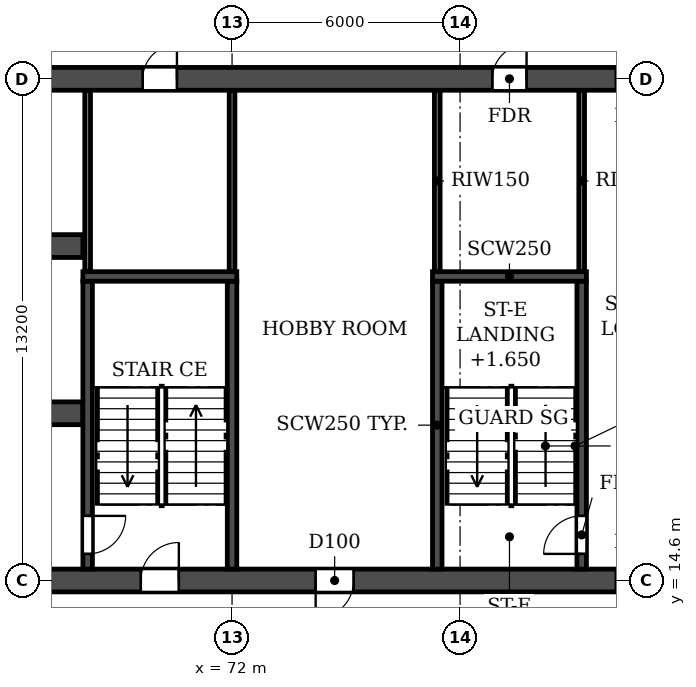
"""IFC4 building model, lengths in metres.
Left out: names, types, materials, properties, quantities, classifications, styles, units other than length and angle.
Written with IfcOpenShell. Run it as: python <this file> out.ifc"""

import sys

from ifc_helpers import new_model, si_unit, direction, frame, frame_2d, origin, place, context, subcontext, project, spatial, rectangle, extrude, element, fill, save


model = new_model("IFC4")
c1 = context("Model", 3, precision=1e-05, world=origin(), true_north=direction((0.0, 1.0)))
c2 = subcontext(c1, "Body", "Model", "MODEL_VIEW")
j1 = project(units=[si_unit("LENGTHUNIT", "METRE"), si_unit("PLANEANGLEUNIT", "RADIAN")], contexts=[c1])
p1 = place(None, origin())
s1 = spatial("IfcSite", under=j1, at=p1, CompositionType="ELEMENT")
p2 = place(p1, origin())
s2 = spatial("IfcBuilding", under=s1, at=p2, CompositionType="ELEMENT")
p3 = place(p2, frame((0.0, 0.0, 33.3)))
s3 = spatial("IfcBuildingStorey", under=s2, at=p3, CompositionType="ELEMENT", Elevation=33.3)
p4 = place(p3, frame((2.6, 14.6, 0.0), z_axis=(0.0, 0.0, 1.0), x_axis=(1.0, 0.0, 0.0)))
e1 = element("IfcWall", 1, at=p4, inside=s3, PredefinedType="SOLIDWALL", context=c2, shape_type="SweptSolid", body=[
    extrude(rectangle(XDim=96.8, YDim=0.6, at=frame_2d((48.4, 0.0))), origin(), (0.0, 0.0, 1.0), 3.05),
])
p5 = place(p4, frame((1.8, 0.0, 0.0)))
e2 = element("IfcOpeningElement", 2, at=p5, cuts=e1, PredefinedType="OPENING", context=c2, shape_type="SweptSolid", body=[
    extrude(rectangle(XDim=1.0, YDim=2.1, at=frame_2d((0.5, 1.05))), frame((0.0, 0.31, 0.0), z_axis=(0.0, -1.0, 0.0), x_axis=(1.0, 0.0, 0.0)), (0.0, 0.0, 1.0), 0.62),
])
p6 = place(p4, frame((9.5, 0.0, 0.0)))
e3 = element("IfcOpeningElement", 3, at=p6, cuts=e1, PredefinedType="OPENING", context=c2, shape_type="SweptSolid", body=[
    extrude(rectangle(XDim=1.0, YDim=2.1, at=frame_2d((0.5, 1.05))), frame((0.0, 0.31, 0.0), z_axis=(0.0, -1.0, 0.0), x_axis=(1.0, 0.0, 0.0)), (0.0, 0.0, 1.0), 0.62),
])
p7 = place(p4, frame((16.3, 0.0, 0.0)))
e4 = element("IfcOpeningElement", 4, at=p7, cuts=e1, PredefinedType="OPENING", context=c2, shape_type="SweptSolid", body=[
    extrude(rectangle(XDim=1.0, YDim=2.1, at=frame_2d((0.5, 1.05))), frame((0.0, 0.31, 0.0), z_axis=(0.0, -1.0, 0.0), x_axis=(1.0, 0.0, 0.0)), (0.0, 0.0, 1.0), 0.62),
])
p8 = place(p4, frame((24.2, 0.0, 0.0)))
e5 = element("IfcOpeningElement", 5, at=p8, cuts=e1, PredefinedType="OPENING", context=c2, shape_type="SweptSolid", body=[
    extrude(rectangle(XDim=1.0, YDim=2.1, at=frame_2d((0.5, 1.05))), frame((0.0, 0.31, 0.0), z_axis=(0.0, -1.0, 0.0), x_axis=(1.0, 0.0, 0.0)), (0.0, 0.0, 1.0), 0.62),
])
p9 = place(p4, frame((28.8, 0.0, 0.0)))
e6 = element("IfcOpeningElement", 6, at=p9, cuts=e1, PredefinedType="OPENING", context=c2, shape_type="SweptSolid", body=[
    extrude(rectangle(XDim=1.0, YDim=2.1, at=frame_2d((0.5, 1.05))), frame((0.0, 0.31, 0.0), z_axis=(0.0, -1.0, 0.0), x_axis=(1.0, 0.0, 0.0)), (0.0, 0.0, 1.0), 0.62),
])
p10 = place(p4, frame((42.7, 0.0, 0.0)))
e7 = element("IfcOpeningElement", 7, at=p10, cuts=e1, PredefinedType="OPENING", context=c2, shape_type="SweptSolid", body=[
    extrude(rectangle(XDim=1.0, YDim=2.1, at=frame_2d((0.5, 1.05))), frame((0.0, 0.31, 0.0), z_axis=(0.0, -1.0, 0.0), x_axis=(1.0, 0.0, 0.0)), (0.0, 0.0, 1.0), 0.62),
])
p11 = place(p4, frame((47.9, 0.0, 0.0)))
e8 = element("IfcOpeningElement", 8, at=p11, cuts=e1, PredefinedType="OPENING", context=c2, shape_type="SweptSolid", body=[
    extrude(rectangle(XDim=1.0, YDim=2.1, at=frame_2d((0.5, 1.05))), frame((0.0, 0.31, 0.0), z_axis=(0.0, -1.0, 0.0), x_axis=(1.0, 0.0, 0.0)), (0.0, 0.0, 1.0), 0.62),
])
p12 = place(p4, frame((53.1, 0.0, 0.0)))
e9 = element("IfcOpeningElement", 9, at=p12, cuts=e1, PredefinedType="OPENING", context=c2, shape_type="SweptSolid", body=[
    extrude(rectangle(XDim=1.0, YDim=2.1, at=frame_2d((0.5, 1.05))), frame((0.0, 0.31, 0.0), z_axis=(0.0, -1.0, 0.0), x_axis=(1.0, 0.0, 0.0)), (0.0, 0.0, 1.0), 0.62),
])
p13 = place(p4, frame((67.0, 0.0, 0.0)))
e10 = element("IfcOpeningElement", 10, at=p13, cuts=e1, PredefinedType="OPENING", context=c2, shape_type="SweptSolid", body=[
    extrude(rectangle(XDim=1.0, YDim=2.1, at=frame_2d((0.5, 1.05))), frame((0.0, 0.31, 0.0), z_axis=(0.0, -1.0, 0.0), x_axis=(1.0, 0.0, 0.0)), (0.0, 0.0, 1.0), 0.62),
])
p14 = place(p4, frame((71.6, 0.0, 0.0)))
e11 = element("IfcOpeningElement", 11, at=p14, cuts=e1, PredefinedType="OPENING", context=c2, shape_type="SweptSolid", body=[
    extrude(rectangle(XDim=1.0, YDim=2.1, at=frame_2d((0.5, 1.05))), frame((0.0, 0.31, 0.0), z_axis=(0.0, -1.0, 0.0), x_axis=(1.0, 0.0, 0.0)), (0.0, 0.0, 1.0), 0.62),
])
p15 = place(p4, frame((79.5, 0.0, 0.0)))
e12 = element("IfcOpeningElement", 12, at=p15, cuts=e1, PredefinedType="OPENING", context=c2, shape_type="SweptSolid", body=[
    extrude(rectangle(XDim=1.0, YDim=2.1, at=frame_2d((0.5, 1.05))), frame((0.0, 0.31, 0.0), z_axis=(0.0, -1.0, 0.0), x_axis=(1.0, 0.0, 0.0)), (0.0, 0.0, 1.0), 0.62),
])
p16 = place(p4, frame((88.6, 0.0, 0.0)))
e13 = element("IfcOpeningElement", 13, at=p16, cuts=e1, PredefinedType="OPENING", context=c2, shape_type="SweptSolid", body=[
    extrude(rectangle(XDim=1.0, YDim=2.1, at=frame_2d((0.5, 1.05))), frame((0.0, 0.31, 0.0), z_axis=(0.0, -1.0, 0.0), x_axis=(1.0, 0.0, 0.0)), (0.0, 0.0, 1.0), 0.62),
])
p17 = place(p3, frame((2.6, 27.8, 0.0), z_axis=(0.0, 0.0, 1.0), x_axis=(1.0, 0.0, 0.0)))
e14 = element("IfcWall", 14, at=p17, inside=s3, PredefinedType="SOLIDWALL", context=c2, shape_type="SweptSolid", body=[
    extrude(rectangle(XDim=96.8, YDim=0.6, at=frame_2d((48.4, 0.0))), origin(), (0.0, 0.0, 1.0), 3.05),
])
p18 = place(p17, frame((2.55, 0.0, 0.0)))
e15 = element("IfcOpeningElement", 15, at=p18, cuts=e14, PredefinedType="OPENING", context=c2, shape_type="SweptSolid", body=[
    extrude(rectangle(XDim=1.0, YDim=2.1, at=frame_2d((0.5, 1.05))), frame((0.0, 0.31, 0.0), z_axis=(0.0, -1.0, 0.0), x_axis=(1.0, 0.0, 0.0)), (0.0, 0.0, 1.0), 0.62),
])
p19 = place(p17, frame((10.25, 0.0, 0.0)))
e16 = element("IfcOpeningElement", 16, at=p19, cuts=e14, PredefinedType="OPENING", context=c2, shape_type="SweptSolid", body=[
    extrude(rectangle(XDim=1.0, YDim=2.1, at=frame_2d((0.5, 1.05))), frame((0.0, 0.31, 0.0), z_axis=(0.0, -1.0, 0.0), x_axis=(1.0, 0.0, 0.0)), (0.0, 0.0, 1.0), 0.62),
])
p20 = place(p17, frame((16.3, 0.0, 0.0)))
e17 = element("IfcOpeningElement", 17, at=p20, cuts=e14, PredefinedType="OPENING", context=c2, shape_type="SweptSolid", body=[
    extrude(rectangle(XDim=1.0, YDim=2.1, at=frame_2d((0.5, 1.05))), frame((0.0, 0.31, 0.0), z_axis=(0.0, -1.0, 0.0), x_axis=(1.0, 0.0, 0.0)), (0.0, 0.0, 1.0), 0.62),
])
p21 = place(p17, frame((19.65, 0.0, 0.0)))
e18 = element("IfcOpeningElement", 18, at=p21, cuts=e14, PredefinedType="OPENING", context=c2, shape_type="SweptSolid", body=[
    extrude(rectangle(XDim=0.9, YDim=2.1, at=frame_2d((0.45, 1.05))), frame((0.0, 0.31, 0.0), z_axis=(0.0, -1.0, 0.0), x_axis=(1.0, 0.0, 0.0)), (0.0, 0.0, 1.0), 0.62),
])
p22 = place(p17, frame((28.85, 0.0, 0.0)))
e19 = element("IfcOpeningElement", 19, at=p22, cuts=e14, PredefinedType="OPENING", context=c2, shape_type="SweptSolid", body=[
    extrude(rectangle(XDim=0.9, YDim=2.1, at=frame_2d((0.45, 1.05))), frame((0.0, 0.31, 0.0), z_axis=(0.0, -1.0, 0.0), x_axis=(1.0, 0.0, 0.0)), (0.0, 0.0, 1.0), 0.62),
])
p23 = place(p17, frame((34.6, 0.0, 0.0)))
e20 = element("IfcOpeningElement", 20, at=p23, cuts=e14, PredefinedType="OPENING", context=c2, shape_type="SweptSolid", body=[
    extrude(rectangle(XDim=1.0, YDim=2.1, at=frame_2d((0.5, 1.05))), frame((0.0, 0.31, 0.0), z_axis=(0.0, -1.0, 0.0), x_axis=(1.0, 0.0, 0.0)), (0.0, 0.0, 1.0), 0.62),
])
p24 = place(p17, frame((39.8, 0.0, 0.0)))
e21 = element("IfcOpeningElement", 21, at=p24, cuts=e14, PredefinedType="OPENING", context=c2, shape_type="SweptSolid", body=[
    extrude(rectangle(XDim=1.0, YDim=2.1, at=frame_2d((0.5, 1.05))), frame((0.0, 0.31, 0.0), z_axis=(0.0, -1.0, 0.0), x_axis=(1.0, 0.0, 0.0)), (0.0, 0.0, 1.0), 0.62),
])
p25 = place(p17, frame((45.0, 0.0, 0.0)))
e22 = element("IfcOpeningElement", 22, at=p25, cuts=e14, PredefinedType="OPENING", context=c2, shape_type="SweptSolid", body=[
    extrude(rectangle(XDim=1.0, YDim=2.1, at=frame_2d((0.5, 1.05))), frame((0.0, 0.31, 0.0), z_axis=(0.0, -1.0, 0.0), x_axis=(1.0, 0.0, 0.0)), (0.0, 0.0, 1.0), 0.62),
])
p26 = place(p17, frame((47.9, 0.0, 0.0)))
e23 = element("IfcOpeningElement", 23, at=p26, cuts=e14, PredefinedType="OPENING", context=c2, shape_type="SweptSolid", body=[
    extrude(rectangle(XDim=1.0, YDim=2.1, at=frame_2d((0.5, 1.05))), frame((0.0, 0.31, 0.0), z_axis=(0.0, -1.0, 0.0), x_axis=(1.0, 0.0, 0.0)), (0.0, 0.0, 1.0), 0.62),
])
p27 = place(p17, frame((50.8, 0.0, 0.0)))
e24 = element("IfcOpeningElement", 24, at=p27, cuts=e14, PredefinedType="OPENING", context=c2, shape_type="SweptSolid", body=[
    extrude(rectangle(XDim=1.0, YDim=2.1, at=frame_2d((0.5, 1.05))), frame((0.0, 0.31, 0.0), z_axis=(0.0, -1.0, 0.0), x_axis=(1.0, 0.0, 0.0)), (0.0, 0.0, 1.0), 0.62),
])
p28 = place(p17, frame((54.7, 0.0, 0.0)))
e25 = element("IfcOpeningElement", 25, at=p28, cuts=e14, PredefinedType="OPENING", context=c2, shape_type="SweptSolid", body=[
    extrude(rectangle(XDim=1.0, YDim=2.1, at=frame_2d((0.5, 1.05))), frame((0.0, 0.31, 0.0), z_axis=(0.0, -1.0, 0.0), x_axis=(1.0, 0.0, 0.0)), (0.0, 0.0, 1.0), 0.62),
])
p29 = place(p17, frame((61.2, 0.0, 0.0)))
e26 = element("IfcOpeningElement", 26, at=p29, cuts=e14, PredefinedType="OPENING", context=c2, shape_type="SweptSolid", body=[
    extrude(rectangle(XDim=1.0, YDim=2.1, at=frame_2d((0.5, 1.05))), frame((0.0, 0.31, 0.0), z_axis=(0.0, -1.0, 0.0), x_axis=(1.0, 0.0, 0.0)), (0.0, 0.0, 1.0), 0.62),
])
p30 = place(p17, frame((67.05, 0.0, 0.0)))
e27 = element("IfcOpeningElement", 27, at=p30, cuts=e14, PredefinedType="OPENING", context=c2, shape_type="SweptSolid", body=[
    extrude(rectangle(XDim=0.9, YDim=2.1, at=frame_2d((0.45, 1.05))), frame((0.0, 0.31, 0.0), z_axis=(0.0, -1.0, 0.0), x_axis=(1.0, 0.0, 0.0)), (0.0, 0.0, 1.0), 0.62),
])
p31 = place(p17, frame((76.25, 0.0, 0.0)))
e28 = element("IfcOpeningElement", 28, at=p31, cuts=e14, PredefinedType="OPENING", context=c2, shape_type="SweptSolid", body=[
    extrude(rectangle(XDim=0.9, YDim=2.1, at=frame_2d((0.45, 1.05))), frame((0.0, 0.31, 0.0), z_axis=(0.0, -1.0, 0.0), x_axis=(1.0, 0.0, 0.0)), (0.0, 0.0, 1.0), 0.62),
])
p32 = place(p17, frame((79.5, 0.0, 0.0)))
e29 = element("IfcOpeningElement", 29, at=p32, cuts=e14, PredefinedType="OPENING", context=c2, shape_type="SweptSolid", body=[
    extrude(rectangle(XDim=1.0, YDim=2.1, at=frame_2d((0.5, 1.05))), frame((0.0, 0.31, 0.0), z_axis=(0.0, -1.0, 0.0), x_axis=(1.0, 0.0, 0.0)), (0.0, 0.0, 1.0), 0.62),
])
p33 = place(p17, frame((86.05, 0.0, 0.0)))
e30 = element("IfcOpeningElement", 30, at=p33, cuts=e14, PredefinedType="OPENING", context=c2, shape_type="SweptSolid", body=[
    extrude(rectangle(XDim=1.5, YDim=2.1, at=frame_2d((0.75, 1.05))), frame((0.0, 0.31, 0.0), z_axis=(0.0, -1.0, 0.0), x_axis=(1.0, 0.0, 0.0)), (0.0, 0.0, 1.0), 0.62),
])
p34 = place(p17, frame((94.0, 0.0, 0.0)))
e31 = element("IfcOpeningElement", 31, at=p34, cuts=e14, PredefinedType="OPENING", context=c2, shape_type="SweptSolid", body=[
    extrude(rectangle(XDim=1.0, YDim=2.1, at=frame_2d((0.5, 1.05))), frame((0.0, 0.31, 0.0), z_axis=(0.0, -1.0, 0.0), x_axis=(1.0, 0.0, 0.0)), (0.0, 0.0, 1.0), 0.62),
])
p35 = place(p3, frame((33.925, 19.0, 0.0), z_axis=(0.0, 0.0, 1.0), x_axis=(1.0, 0.0, 0.0)))
e32 = element("IfcWall", 32, at=p35, inside=s3, PredefinedType="SOLIDWALL", context=c2, shape_type="SweptSolid", body=[
    extrude(rectangle(XDim=34.15, YDim=0.6, at=frame_2d((17.075, 0.0))), origin(), (0.0, 0.0, 1.0), 3.05),
])
p36 = place(p35, frame((16.175, 0.0, 0.0)))
e33 = element("IfcOpeningElement", 33, at=p36, cuts=e32, PredefinedType="OPENING", context=c2, shape_type="SweptSolid", body=[
    extrude(rectangle(XDim=1.8, YDim=2.1, at=frame_2d((0.9, 1.05))), frame((0.0, 0.31, 0.0), z_axis=(0.0, -1.0, 0.0), x_axis=(1.0, 0.0, 0.0)), (0.0, 0.0, 1.0), 0.62),
])
p37 = place(p35, frame((1.525, 0.0, 0.0)))
e34 = element("IfcOpeningElement", 34, at=p37, cuts=e32, PredefinedType="OPENING", context=c2, shape_type="SweptSolid", body=[
    extrude(rectangle(XDim=1.8, YDim=2.1, at=frame_2d((0.9, 1.05))), frame((0.0, 0.31, 0.0), z_axis=(0.0, -1.0, 0.0), x_axis=(1.0, 0.0, 0.0)), (0.0, 0.0, 1.0), 0.62),
])
p38 = place(p35, frame((8.725, 0.0, 0.0)))
e35 = element("IfcOpeningElement", 35, at=p38, cuts=e32, PredefinedType="OPENING", context=c2, shape_type="SweptSolid", body=[
    extrude(rectangle(XDim=1.1, YDim=2.1, at=frame_2d((0.55, 1.05))), frame((0.0, 0.31, 0.0), z_axis=(0.0, -1.0, 0.0), x_axis=(1.0, 0.0, 0.0)), (0.0, 0.0, 1.0), 0.62),
])
p39 = place(p35, frame((11.325, 0.0, 0.0)))
e36 = element("IfcOpeningElement", 36, at=p39, cuts=e32, PredefinedType="OPENING", context=c2, shape_type="SweptSolid", body=[
    extrude(rectangle(XDim=1.1, YDim=2.1, at=frame_2d((0.55, 1.05))), frame((0.0, 0.31, 0.0), z_axis=(0.0, -1.0, 0.0), x_axis=(1.0, 0.0, 0.0)), (0.0, 0.0, 1.0), 0.62),
])
p40 = place(p35, frame((13.925, 0.0, 0.0)))
e37 = element("IfcOpeningElement", 37, at=p40, cuts=e32, PredefinedType="OPENING", context=c2, shape_type="SweptSolid", body=[
    extrude(rectangle(XDim=1.1, YDim=2.1, at=frame_2d((0.55, 1.05))), frame((0.0, 0.31, 0.0), z_axis=(0.0, -1.0, 0.0), x_axis=(1.0, 0.0, 0.0)), (0.0, 0.0, 1.0), 0.62),
])
p41 = place(p35, frame((19.125, 0.0, 0.0)))
e38 = element("IfcOpeningElement", 38, at=p41, cuts=e32, PredefinedType="OPENING", context=c2, shape_type="SweptSolid", body=[
    extrude(rectangle(XDim=1.1, YDim=2.1, at=frame_2d((0.55, 1.05))), frame((0.0, 0.31, 0.0), z_axis=(0.0, -1.0, 0.0), x_axis=(1.0, 0.0, 0.0)), (0.0, 0.0, 1.0), 0.62),
])
p42 = place(p35, frame((21.725, 0.0, 0.0)))
e39 = element("IfcOpeningElement", 39, at=p42, cuts=e32, PredefinedType="OPENING", context=c2, shape_type="SweptSolid", body=[
    extrude(rectangle(XDim=1.1, YDim=2.1, at=frame_2d((0.55, 1.05))), frame((0.0, 0.31, 0.0), z_axis=(0.0, -1.0, 0.0), x_axis=(1.0, 0.0, 0.0)), (0.0, 0.0, 1.0), 0.62),
])
p43 = place(p35, frame((24.325, 0.0, 0.0)))
e40 = element("IfcOpeningElement", 40, at=p43, cuts=e32, PredefinedType="OPENING", context=c2, shape_type="SweptSolid", body=[
    extrude(rectangle(XDim=1.1, YDim=2.1, at=frame_2d((0.55, 1.05))), frame((0.0, 0.31, 0.0), z_axis=(0.0, -1.0, 0.0), x_axis=(1.0, 0.0, 0.0)), (0.0, 0.0, 1.0), 0.62),
])
p44 = place(p35, frame((30.825, 0.0, 0.0)))
e41 = element("IfcOpeningElement", 41, at=p44, cuts=e32, PredefinedType="OPENING", context=c2, shape_type="SweptSolid", body=[
    extrude(rectangle(XDim=1.8, YDim=2.1, at=frame_2d((0.9, 1.05))), frame((0.0, 0.31, 0.0), z_axis=(0.0, -1.0, 0.0), x_axis=(1.0, 0.0, 0.0)), (0.0, 0.0, 1.0), 0.62),
])
p45 = place(p3, frame((33.925, 23.4, 0.0), z_axis=(0.0, 0.0, 1.0), x_axis=(1.0, 0.0, 0.0)))
e42 = element("IfcWall", 42, at=p45, inside=s3, PredefinedType="SOLIDWALL", context=c2, shape_type="SweptSolid", body=[
    extrude(rectangle(XDim=34.15, YDim=0.6, at=frame_2d((17.075, 0.0))), origin(), (0.0, 0.0, 1.0), 3.05),
])
p46 = place(p45, frame((16.175, 0.0, 0.0)))
e43 = element("IfcOpeningElement", 43, at=p46, cuts=e42, PredefinedType="OPENING", context=c2, shape_type="SweptSolid", body=[
    extrude(rectangle(XDim=1.8, YDim=2.1, at=frame_2d((0.9, 1.05))), frame((0.0, 0.31, 0.0), z_axis=(0.0, -1.0, 0.0), x_axis=(1.0, 0.0, 0.0)), (0.0, 0.0, 1.0), 0.62),
])
p47 = place(p45, frame((11.025, 0.0, 0.0)))
e44 = element("IfcOpeningElement", 44, at=p47, cuts=e42, PredefinedType="OPENING", context=c2, shape_type="SweptSolid", body=[
    extrude(rectangle(XDim=1.1, YDim=2.1, at=frame_2d((0.55, 1.05))), frame((0.0, 0.31, 0.0), z_axis=(0.0, -1.0, 0.0), x_axis=(1.0, 0.0, 0.0)), (0.0, 0.0, 1.0), 0.62),
])
p48 = place(p3, frame((68.2, 14.9, 0.0), z_axis=(0.0, 0.0, 1.0), x_axis=(0.0, 1.0, 0.0)))
e45 = element("IfcWall", 45, at=p48, inside=s3, PredefinedType="SOLIDWALL", context=c2, shape_type="SweptSolid", body=[
    extrude(rectangle(XDim=7.575, YDim=0.25, at=frame_2d((3.788, 0.0))), origin(), (0.0, 0.0, 1.0), 3.05),
])
p49 = place(p48, frame((0.4, 0.0, 0.0)))
e46 = element("IfcOpeningElement", 46, at=p49, cuts=e45, PredefinedType="OPENING", context=c2, shape_type="SweptSolid", body=[
    extrude(rectangle(XDim=1.0, YDim=2.1, at=frame_2d((0.5, 1.05))), frame((0.0, 0.135, 0.0), z_axis=(0.0, -1.0, 0.0), x_axis=(1.0, 0.0, 0.0)), (0.0, 0.0, 1.0), 0.27),
])
p50 = place(p3, frame((72.0, 14.9, 0.0), z_axis=(0.0, 0.0, 1.0), x_axis=(0.0, 1.0, 0.0)))
e47 = element("IfcWall", 47, at=p50, inside=s3, PredefinedType="SOLIDWALL", context=c2, shape_type="SweptSolid", body=[
    extrude(rectangle(XDim=7.575, YDim=0.25, at=frame_2d((3.788, 0.0))), origin(), (0.0, 0.0, 1.0), 3.05),
])
p51 = place(p3, frame((68.075, 22.6, 0.0), z_axis=(0.0, 0.0, 1.0), x_axis=(1.0, 0.0, 0.0)))
e48 = element("IfcWall", 48, at=p51, inside=s3, PredefinedType="SOLIDWALL", context=c2, shape_type="SweptSolid", body=[
    extrude(rectangle(XDim=4.05, YDim=0.25, at=frame_2d((2.025, 0.0))), origin(), (0.0, 0.0, 1.0), 3.05),
])
p52 = place(p3, frame((77.4, 14.9, 0.0), z_axis=(0.0, 0.0, 1.0), x_axis=(0.0, 1.0, 0.0)))
e49 = element("IfcWall", 49, at=p52, inside=s3, PredefinedType="SOLIDWALL", context=c2, shape_type="SweptSolid", body=[
    extrude(rectangle(XDim=7.575, YDim=0.25, at=frame_2d((3.788, 0.0))), origin(), (0.0, 0.0, 1.0), 3.05),
])
p53 = place(p3, frame((81.2, 14.9, 0.0), z_axis=(0.0, 0.0, 1.0), x_axis=(0.0, 1.0, 0.0)))
e50 = element("IfcWall", 50, at=p53, inside=s3, PredefinedType="SOLIDWALL", context=c2, shape_type="SweptSolid", body=[
    extrude(rectangle(XDim=7.575, YDim=0.25, at=frame_2d((3.788, 0.0))), origin(), (0.0, 0.0, 1.0), 3.05),
])
p54 = place(p53, frame((0.4, 0.0, 0.0)))
e51 = element("IfcOpeningElement", 51, at=p54, cuts=e50, PredefinedType="OPENING", context=c2, shape_type="SweptSolid", body=[
    extrude(rectangle(XDim=1.0, YDim=2.1, at=frame_2d((0.5, 1.05))), frame((0.0, 0.135, 0.0), z_axis=(0.0, -1.0, 0.0), x_axis=(1.0, 0.0, 0.0)), (0.0, 0.0, 1.0), 0.27),
])
p55 = place(p3, frame((77.275, 22.6, 0.0), z_axis=(0.0, 0.0, 1.0), x_axis=(1.0, 0.0, 0.0)))
e52 = element("IfcWall", 52, at=p55, inside=s3, PredefinedType="SOLIDWALL", context=c2, shape_type="SweptSolid", body=[
    extrude(rectangle(XDim=4.05, YDim=0.25, at=frame_2d((2.025, 0.0))), origin(), (0.0, 0.0, 1.0), 3.05),
])
for number, where, z_axis, x_axis in (
    (53, (68.2, 22.735, 0.0), (0.0, 0.0, 1.0), (0.0, 1.0, 0.0)),
    (54, (72.0, 22.735, 0.0), (0.0, 0.0, 1.0), (0.0, 1.0, 0.0)),
    (55, (77.4, 22.735, 0.0), (0.0, 0.0, 1.0), (0.0, 1.0, 0.0)),
    (56, (81.2, 22.735, 0.0), (0.0, 0.0, 1.0), (0.0, 1.0, 0.0)),
):
    element("IfcWall", number, at=place(p3, frame(where, z_axis=z_axis, x_axis=x_axis)), inside=s3, PredefinedType="PARTITIONING", context=c2, shape_type="SweptSolid", body=[
        extrude(rectangle(XDim=4.755, YDim=0.15, at=frame_2d((2.377, 0.0))), origin(), (0.0, 0.0, 1.0), 3.05),
    ])
p56 = place(p30, origin())
e57 = element("IfcDoor", 57, at=p56, inside=s3, OperationType="SINGLE_SWING_RIGHT", PredefinedType="DOOR", context=c2, shape_type="SweptSolid", body=[
    extrude(rectangle(XDim=0.9, YDim=2.1, at=frame_2d((0.45, 1.05))), frame((0.0, 0.025, 0.0), z_axis=(0.0, -1.0, 0.0), x_axis=(1.0, 0.0, 0.0)), (0.0, 0.0, 1.0), 0.05),
])
fill(e27, e57)
p57 = place(p31, origin())
e58 = element("IfcDoor", 58, at=p57, inside=s3, OperationType="SINGLE_SWING_RIGHT", PredefinedType="DOOR", context=c2, shape_type="SweptSolid", body=[
    extrude(rectangle(XDim=0.9, YDim=2.1, at=frame_2d((0.45, 1.05))), frame((0.0, 0.025, 0.0), z_axis=(0.0, -1.0, 0.0), x_axis=(1.0, 0.0, 0.0)), (0.0, 0.0, 1.0), 0.05),
])
fill(e28, e58)
p58 = place(p32, origin())
e59 = element("IfcDoor", 59, at=p58, inside=s3, OperationType="SINGLE_SWING_RIGHT", PredefinedType="DOOR", context=c2, shape_type="SweptSolid", body=[
    extrude(rectangle(XDim=1.0, YDim=2.1, at=frame_2d((0.5, 1.05))), frame((0.0, 0.025, 0.0), z_axis=(0.0, -1.0, 0.0), x_axis=(1.0, 0.0, 0.0)), (0.0, 0.0, 1.0), 0.05),
])
fill(e29, e59)
p59 = place(p13, origin())
e60 = element("IfcDoor", 60, at=p59, inside=s3, OperationType="SINGLE_SWING_RIGHT", PredefinedType="DOOR", context=c2, shape_type="SweptSolid", body=[
    extrude(rectangle(XDim=1.0, YDim=2.1, at=frame_2d((0.5, 1.05))), frame((0.0, 0.025, 0.0), z_axis=(0.0, -1.0, 0.0), x_axis=(1.0, 0.0, 0.0)), (0.0, 0.0, 1.0), 0.05),
])
fill(e10, e60)
p60 = place(p14, frame((1.0, 0.0, 0.0), z_axis=(0.0, 0.0, 1.0), x_axis=(-1.0, 0.0, 0.0)))
e61 = element("IfcDoor", 61, at=p60, inside=s3, OperationType="SINGLE_SWING_RIGHT", PredefinedType="DOOR", context=c2, shape_type="SweptSolid", body=[
    extrude(rectangle(XDim=1.0, YDim=2.1, at=frame_2d((0.5, 1.05))), frame((0.0, 0.025, 0.0), z_axis=(0.0, -1.0, 0.0), x_axis=(1.0, 0.0, 0.0)), (0.0, 0.0, 1.0), 0.05),
])
fill(e11, e61)
p61 = place(p15, frame((1.0, 0.0, 0.0), z_axis=(0.0, 0.0, 1.0), x_axis=(-1.0, 0.0, 0.0)))
e62 = element("IfcDoor", 62, at=p61, inside=s3, OperationType="SINGLE_SWING_LEFT", PredefinedType="DOOR", context=c2, shape_type="SweptSolid", body=[
    extrude(rectangle(XDim=1.0, YDim=2.1, at=frame_2d((0.5, 1.05))), frame((0.0, 0.025, 0.0), z_axis=(0.0, -1.0, 0.0), x_axis=(1.0, 0.0, 0.0)), (0.0, 0.0, 1.0), 0.05),
])
fill(e12, e62)
p62 = place(p49, frame((1.0, 0.0, 0.0), z_axis=(0.0, 0.0, 1.0), x_axis=(-1.0, 0.0, 0.0)))
e63 = element("IfcDoor", 63, at=p62, inside=s3, OperationType="SINGLE_SWING_LEFT", PredefinedType="DOOR", context=c2, shape_type="SweptSolid", body=[
    extrude(rectangle(XDim=1.0, YDim=2.1, at=frame_2d((0.5, 1.05))), frame((0.0, 0.025, 0.0), z_axis=(0.0, -1.0, 0.0), x_axis=(1.0, 0.0, 0.0)), (0.0, 0.0, 1.0), 0.05),
])
fill(e46, e63)
p63 = place(p54, origin())
e64 = element("IfcDoor", 64, at=p63, inside=s3, OperationType="SINGLE_SWING_LEFT", PredefinedType="DOOR", context=c2, shape_type="SweptSolid", body=[
    extrude(rectangle(XDim=1.0, YDim=2.1, at=frame_2d((0.5, 1.05))), frame((0.0, 0.025, 0.0), z_axis=(0.0, -1.0, 0.0), x_axis=(1.0, 0.0, 0.0)), (0.0, 0.0, 1.0), 0.05),
])
fill(e51, e64)
save(model, sys.argv[1])
